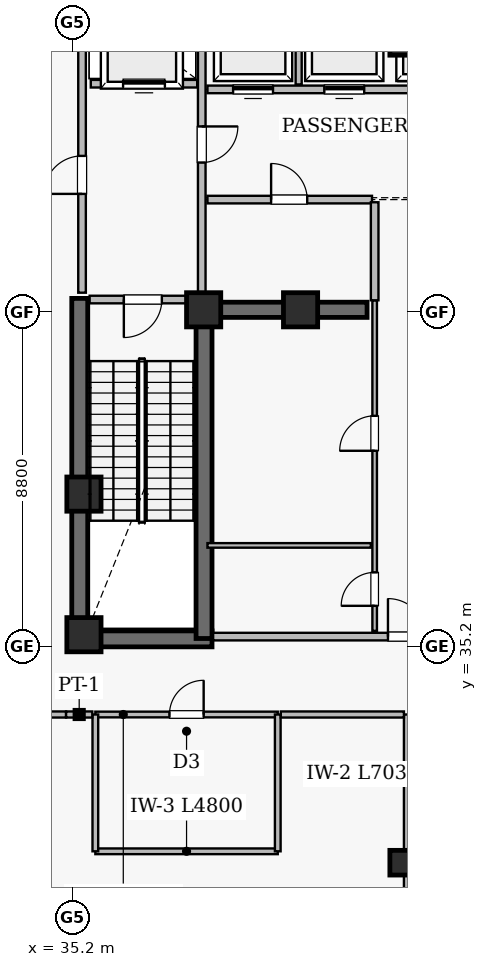
"""IFC4 building model, lengths in metres.
Left out: names, types, materials, properties, quantities, classifications, styles, units other than length and angle.
Written with IfcOpenShell. Run it as: python <this file> out.ifc"""

import sys

from ifc_helpers import new_model, si_unit, direction, frame, frame_2d, origin, origin_2d, place, context, subcontext, project, spatial, rectangle, extrude, element, fill, save


model = new_model("IFC4")
c1 = context("Model", 3, precision=1e-05, world=origin(), true_north=direction((0.0, 1.0)))
c2 = subcontext(c1, "Body", "Model", "MODEL_VIEW")
j1 = project(units=[si_unit("LENGTHUNIT", "METRE"), si_unit("PLANEANGLEUNIT", "RADIAN")], contexts=[c1])
p1 = place(None, origin())
s1 = spatial("IfcSite", under=j1, at=p1, CompositionType="ELEMENT")
p2 = place(p1, origin())
s2 = spatial("IfcBuilding", under=s1, at=p2, CompositionType="ELEMENT")
p3 = place(p2, frame((0.0, 0.0, 289.6)))
s3 = spatial("IfcBuildingStorey", under=s2, at=p3, CompositionType="ELEMENT", Elevation=289.6)
p4 = place(p3, frame((35.18, 35.39, 0.0), z_axis=(0.0, 0.0, 1.0), x_axis=(1.0, 0.0, 0.0)))
e1 = element("IfcWall", 1, at=p4, inside=s3, PredefinedType="SHEAR", context=c2, shape_type="SweptSolid", body=[
    extrude(rectangle(XDim=3.69, YDim=0.42, at=frame_2d((1.845, 0.0))), origin(), (0.0, 0.0, 1.0), 5.51),
])
p5 = place(p3, frame((35.39, 35.18, 0.0), z_axis=(0.0, 0.0, 1.0), x_axis=(0.0, 1.0, 0.0)))
e2 = element("IfcWall", 2, at=p5, inside=s3, PredefinedType="SHEAR", context=c2, shape_type="SweptSolid", body=[
    extrude(rectangle(XDim=9.17, YDim=0.42, at=frame_2d((4.585, 0.0))), origin(), (0.0, 0.0, 1.0), 5.51),
])
p6 = place(p3, frame((38.66, 35.4, 0.0), z_axis=(0.0, 0.0, 1.0), x_axis=(0.0, 1.0, 0.0)))
e3 = element("IfcWall", 3, at=p6, inside=s3, PredefinedType="SHEAR", context=c2, shape_type="SweptSolid", body=[
    extrude(rectangle(XDim=8.95, YDim=0.42, at=frame_2d((4.475, 0.0))), origin(), (0.0, 0.0, 1.0), 5.51),
])
p7 = place(p3, frame((44.0, 50.1, 0.0), z_axis=(0.0, 0.0, 1.0), x_axis=(0.0, 1.0, 0.0)))
e4 = element("IfcWall", 4, at=p7, inside=s3, PredefinedType="SHEAR", context=c2, shape_type="SweptSolid", body=[
    extrude(rectangle(XDim=2.1, YDim=0.4, at=frame_2d((1.05, 0.0))), origin(), (0.0, 0.0, 1.0), 5.51),
])
p8 = place(p3, frame((38.75, 44.05, 0.0), z_axis=(0.0, 0.0, 1.0), x_axis=(1.0, 0.0, 0.0)))
e5 = element("IfcWall", 5, at=p8, inside=s3, PredefinedType="SHEAR", context=c2, shape_type="SweptSolid", body=[
    extrude(rectangle(XDim=4.2, YDim=0.4, at=frame_2d((2.1, 0.0))), origin(), (0.0, 0.0, 1.0), 5.51),
])
for number, where, z_axis, x_axis in (
    (6, (35.5, 35.5, 0.0), (0.0, 0.0, 1.0), (1.0, 0.0, 0.0)),
    (7, (38.65, 44.05, 0.0), (0.0, 0.0, 1.0), (1.0, 0.0, 0.0)),
    (8, (44.0, 51.2, 0.0), (0.0, 0.0, 1.0), (1.0, 0.0, 0.0)),
    (9, (35.5, 39.2, 0.0), (0.0, 0.0, 1.0), (1.0, 0.0, 0.0)),
    (10, (41.2, 44.05, 0.0), (0.0, 0.0, 1.0), (1.0, 0.0, 0.0)),
):
    element("IfcColumn", number, at=place(p3, frame(where, z_axis=z_axis, x_axis=x_axis)), inside=s3, PredefinedType="COLUMN", context=c2, shape_type="SweptSolid", body=[
        extrude(rectangle(XDim=0.9, YDim=0.9, at=origin_2d()), origin(), (0.0, 0.0, 1.0), 5.8),
    ])
p9 = place(p3, frame((44.0, 29.5, 0.0), z_axis=(0.0, 0.0, 1.0), x_axis=(1.0, 0.0, 0.0)))
e11 = element("IfcColumn", 11, at=p9, inside=s3, PredefinedType="COLUMN", context=c2, shape_type="SweptSolid", body=[
    extrude(rectangle(XDim=0.9, YDim=0.65, at=origin_2d()), origin(), (0.0, 0.0, 1.0), 5.8),
])
p10 = place(p3, frame((38.9, 35.45, 0.0), z_axis=(0.0, 0.0, 1.0), x_axis=(1.0, 0.0, 0.0)))
e12 = element("IfcWall", 12, at=p10, inside=s3, PredefinedType="SOLIDWALL", context=c2, shape_type="SweptSolid", body=[
    extrude(rectangle(XDim=10.2, YDim=0.2, at=frame_2d((5.1, 0.0))), origin(), (0.0, 0.0, 1.0), 5.51),
])
p11 = place(p10, frame((4.6, 0.0, 0.0)))
e13 = element("IfcOpeningElement", 13, at=p11, cuts=e12, PredefinedType="OPENING", context=c2, shape_type="SweptSolid", body=[
    extrude(rectangle(XDim=1.0, YDim=2.15, at=frame_2d((0.5, 1.075))), frame((0.0, 0.11, 0.0), z_axis=(0.0, -1.0, 0.0), x_axis=(1.0, 0.0, 0.0)), (0.0, 0.0, 1.0), 0.22),
])
p12 = place(p3, frame((43.15, 35.6, 0.0), z_axis=(0.0, 0.0, 1.0), x_axis=(0.0, 1.0, 0.0)))
e14 = element("IfcWall", 14, at=p12, inside=s3, PredefinedType="PARTITIONING", context=c2, shape_type="SweptSolid", body=[
    extrude(rectangle(XDim=8.7, YDim=0.12, at=frame_2d((4.35, 0.0))), origin(), (0.0, 0.0, 1.0), 5.51),
])
p13 = place(p12, frame((0.66, 0.0, 0.0)))
e15 = element("IfcOpeningElement", 15, at=p13, cuts=e14, PredefinedType="OPENING", context=c2, shape_type="SweptSolid", body=[
    extrude(rectangle(XDim=0.88, YDim=2.1, at=frame_2d((0.44, 1.05))), frame((0.0, 0.07, 0.0), z_axis=(0.0, -1.0, 0.0), x_axis=(1.0, 0.0, 0.0)), (0.0, 0.0, 1.0), 0.14),
])
p14 = place(p12, frame((4.74, 0.0, 0.0)))
e16 = element("IfcOpeningElement", 16, at=p14, cuts=e14, PredefinedType="OPENING", context=c2, shape_type="SweptSolid", body=[
    extrude(rectangle(XDim=0.92, YDim=2.1, at=frame_2d((0.46, 1.05))), frame((0.0, 0.07, 0.0), z_axis=(0.0, -1.0, 0.0), x_axis=(1.0, 0.0, 0.0)), (0.0, 0.0, 1.0), 0.14),
])
p15 = place(p3, frame((35.45, 44.5, 0.0), z_axis=(0.0, 0.0, 1.0), x_axis=(0.0, 1.0, 0.0)))
e17 = element("IfcWall", 17, at=p15, inside=s3, PredefinedType="SOLIDWALL", context=c2, shape_type="SweptSolid", body=[
    extrude(rectangle(XDim=7.92, YDim=0.2, at=frame_2d((3.96, 0.0))), origin(), (0.0, 0.0, 1.0), 5.51),
])
p16 = place(p15, frame((2.6, 0.0, 0.0)))
e18 = element("IfcOpeningElement", 18, at=p16, cuts=e17, PredefinedType="OPENING", context=c2, shape_type="SweptSolid", body=[
    extrude(rectangle(XDim=1.0, YDim=2.15, at=frame_2d((0.5, 1.075))), frame((0.0, 0.11, 0.0), z_axis=(0.0, -1.0, 0.0), x_axis=(1.0, 0.0, 0.0)), (0.0, 0.0, 1.0), 0.22),
])
p17 = place(p3, frame((38.6, 44.5, 0.0), z_axis=(0.0, 0.0, 1.0), x_axis=(0.0, 1.0, 0.0)))
e19 = element("IfcWall", 19, at=p17, inside=s3, PredefinedType="SOLIDWALL", context=c2, shape_type="SweptSolid", body=[
    extrude(rectangle(XDim=7.92, YDim=0.2, at=frame_2d((3.96, 0.0))), origin(), (0.0, 0.0, 1.0), 5.51),
])
p18 = place(p17, frame((3.425, 0.0, 0.0)))
e20 = element("IfcOpeningElement", 20, at=p18, cuts=e19, PredefinedType="OPENING", context=c2, shape_type="SweptSolid", body=[
    extrude(rectangle(XDim=0.95, YDim=2.15, at=frame_2d((0.475, 1.075))), frame((0.0, 0.11, 0.0), z_axis=(0.0, -1.0, 0.0), x_axis=(1.0, 0.0, 0.0)), (0.0, 0.0, 1.0), 0.22),
])
p19 = place(p3, frame((38.75, 49.85, 0.0), z_axis=(0.0, 0.0, 1.0), x_axis=(1.0, 0.0, 0.0)))
e21 = element("IfcWall", 21, at=p19, inside=s3, PredefinedType="SOLIDWALL", context=c2, shape_type="SweptSolid", body=[
    extrude(rectangle(XDim=5.5, YDim=0.2, at=frame_2d((2.75, 0.0))), origin(), (0.0, 0.0, 1.0), 5.51),
])
p20 = place(p19, frame((0.675, 0.0, 0.0)))
e22 = element("IfcOpeningElement", 22, at=p20, cuts=e21, PredefinedType="OPENING", context=c2, shape_type="SweptSolid", body=[
    extrude(rectangle(XDim=1.05, YDim=2.15, at=frame_2d((0.525, 1.075))), frame((0.0, 0.11, 0.0), z_axis=(0.0, -1.0, 0.0), x_axis=(1.0, 0.0, 0.0)), (0.0, 0.0, 1.0), 0.22),
])
p21 = place(p19, frame((3.075, 0.0, 0.0)))
e23 = element("IfcOpeningElement", 23, at=p21, cuts=e21, PredefinedType="OPENING", context=c2, shape_type="SweptSolid", body=[
    extrude(rectangle(XDim=1.05, YDim=2.15, at=frame_2d((0.525, 1.075))), frame((0.0, 0.11, 0.0), z_axis=(0.0, -1.0, 0.0), x_axis=(1.0, 0.0, 0.0)), (0.0, 0.0, 1.0), 0.22),
])
p22 = place(p3, frame((35.8, 33.4, 0.0), z_axis=(0.0, 0.0, 1.0), x_axis=(1.0, 0.0, 0.0)))
e24 = element("IfcWall", 24, at=p22, inside=s3, PredefinedType="PLUMBINGWALL", context=c2, shape_type="SweptSolid", body=[
    extrude(rectangle(XDim=4.8, YDim=0.15, at=frame_2d((2.4, 0.0))), origin(), (0.0, 0.0, 1.0), 4.848),
])
p23 = place(p22, frame((1.95, 0.0, 0.0)))
e25 = element("IfcOpeningElement", 25, at=p23, cuts=e24, PredefinedType="OPENING", context=c2, shape_type="SweptSolid", body=[
    extrude(rectangle(XDim=0.9, YDim=2.1, at=frame_2d((0.45, 1.05))), frame((0.0, 0.085, 0.0), z_axis=(0.0, -1.0, 0.0), x_axis=(1.0, 0.0, 0.0)), (0.0, 0.0, 1.0), 0.17),
])
p24 = place(p3, frame((38.75, 46.95, 0.0), z_axis=(0.0, 0.0, 1.0), x_axis=(1.0, 0.0, 0.0)))
e26 = element("IfcWall", 26, at=p24, inside=s3, PredefinedType="SOLIDWALL", context=c2, shape_type="SweptSolid", body=[
    extrude(rectangle(XDim=4.33, YDim=0.2, at=frame_2d((2.165, 0.0))), origin(), (0.0, 0.0, 1.0), 5.51),
])
p25 = place(p24, frame((1.675, 0.0, 0.0)))
e27 = element("IfcOpeningElement", 27, at=p25, cuts=e26, PredefinedType="OPENING", context=c2, shape_type="SweptSolid", body=[
    extrude(rectangle(XDim=0.95, YDim=2.1, at=frame_2d((0.475, 1.05))), frame((0.0, 0.11, 0.0), z_axis=(0.0, -1.0, 0.0), x_axis=(1.0, 0.0, 0.0)), (0.0, 0.0, 1.0), 0.22),
])
p26 = place(p3, frame((35.65, 44.32, 0.0), z_axis=(0.0, 0.0, 1.0), x_axis=(1.0, 0.0, 0.0)))
e28 = element("IfcWall", 28, at=p26, inside=s3, PredefinedType="SOLIDWALL", context=c2, shape_type="SweptSolid", body=[
    extrude(rectangle(XDim=2.8, YDim=0.2, at=frame_2d((1.4, 0.0))), origin(), (0.0, 0.0, 1.0), 5.51),
])
p27 = place(p26, frame((0.9, 0.0, 0.0)))
e29 = element("IfcOpeningElement", 29, at=p27, cuts=e28, PredefinedType="OPENING", context=c2, shape_type="SweptSolid", body=[
    extrude(rectangle(XDim=1.0, YDim=2.15, at=frame_2d((0.5, 1.075))), frame((0.0, 0.11, 0.0), z_axis=(0.0, -1.0, 0.0), x_axis=(1.0, 0.0, 0.0)), (0.0, 0.0, 1.0), 0.22),
])
p28 = place(p3, frame((35.68, 50.0, 0.0), z_axis=(0.0, 0.0, 1.0), x_axis=(1.0, 0.0, 0.0)))
e30 = element("IfcWall", 30, at=p28, inside=s3, PredefinedType="SOLIDWALL", context=c2, shape_type="SweptSolid", body=[
    extrude(rectangle(XDim=2.8, YDim=0.2, at=frame_2d((1.4, 0.0))), origin(), (0.0, 0.0, 1.0), 5.51),
])
p29 = place(p28, frame((0.85, 0.0, 0.0)))
e31 = element("IfcOpeningElement", 31, at=p29, cuts=e30, PredefinedType="OPENING", context=c2, shape_type="SweptSolid", body=[
    extrude(rectangle(XDim=1.1, YDim=2.15, at=frame_2d((0.55, 1.075))), frame((0.0, 0.11, 0.0), z_axis=(0.0, -1.0, 0.0), x_axis=(1.0, 0.0, 0.0)), (0.0, 0.0, 1.0), 0.22),
])
p30 = place(p3, frame((44.0, 26.363, 0.0), z_axis=(0.0, 0.0, 1.0), x_axis=(0.0, 1.0, 0.0)))
e32 = element("IfcWall", 32, at=p30, inside=s3, PredefinedType="SOLIDWALL", context=c2, shape_type="SweptSolid", body=[
    extrude(rectangle(XDim=7.037, YDim=0.16, at=frame_2d((3.519, 0.0))), origin(), (0.0, 0.0, 1.0), 4.848),
])
p31 = place(p3, frame((35.8, 29.8, 0.0), z_axis=(0.0, 0.0, 1.0), x_axis=(1.0, 0.0, 0.0)))
e33 = element("IfcWall", 33, at=p31, inside=s3, PredefinedType="PLUMBINGWALL", context=c2, shape_type="SweptSolid", body=[
    extrude(rectangle(XDim=4.8, YDim=0.15, at=frame_2d((2.4, 0.0))), origin(), (0.0, 0.0, 1.0), 5.51),
])
p32 = place(p3, frame((38.75, 37.85, 0.0), z_axis=(0.0, 0.0, 1.0), x_axis=(1.0, 0.0, 0.0)))
e34 = element("IfcWall", 34, at=p32, inside=s3, PredefinedType="PARTITIONING", context=c2, shape_type="SweptSolid", body=[
    extrude(rectangle(XDim=4.3, YDim=0.12, at=frame_2d((2.15, 0.0))), origin(), (0.0, 0.0, 1.0), 5.51),
])
p33 = place(p3, frame((35.8, 33.4, 0.0), z_axis=(0.0, 0.0, 1.0), x_axis=(0.0, -1.0, 0.0)))
e35 = element("IfcWall", 35, at=p33, inside=s3, PredefinedType="PLUMBINGWALL", context=c2, shape_type="SweptSolid", body=[
    extrude(rectangle(XDim=3.6, YDim=0.15, at=frame_2d((1.8, 0.0))), origin(), (0.0, 0.0, 1.0), 5.51),
])
p34 = place(p3, frame((40.6, 29.8, 0.0), z_axis=(0.0, 0.0, 1.0), x_axis=(0.0, 1.0, 0.0)))
e36 = element("IfcWall", 36, at=p34, inside=s3, PredefinedType="PLUMBINGWALL", context=c2, shape_type="SweptSolid", body=[
    extrude(rectangle(XDim=3.6, YDim=0.15, at=frame_2d((1.8, 0.0))), origin(), (0.0, 0.0, 1.0), 4.848),
])
p35 = place(p3, frame((40.68, 33.4, 0.0), z_axis=(0.0, 0.0, 1.0), x_axis=(1.0, 0.0, 0.0)))
e37 = element("IfcWall", 37, at=p35, inside=s3, PredefinedType="SOLIDWALL", context=c2, shape_type="SweptSolid", body=[
    extrude(rectangle(XDim=3.24, YDim=0.16, at=frame_2d((1.62, 0.0))), origin(), (0.0, 0.0, 1.0), 5.51),
])
p36 = place(p3, frame((43.15, 44.3, 0.0), z_axis=(0.0, 0.0, 1.0), x_axis=(0.0, 1.0, 0.0)))
e38 = element("IfcWall", 38, at=p36, inside=s3, PredefinedType="SOLIDWALL", context=c2, shape_type="SweptSolid", body=[
    extrude(rectangle(XDim=2.58, YDim=0.2, at=frame_2d((1.29, 0.0))), origin(), (0.0, 0.0, 1.0), 5.51),
])
p37 = place(p3, frame((41.15, 49.98, 0.0), z_axis=(0.0, 0.0, 1.0), x_axis=(0.0, 1.0, 0.0)))
e39 = element("IfcWall", 39, at=p37, inside=s3, PredefinedType="SOLIDWALL", context=c2, shape_type="SweptSolid", body=[
    extrude(rectangle(XDim=2.37, YDim=0.16, at=frame_2d((1.185, 0.0))), origin(), (0.0, 0.0, 1.0), 5.51),
])
p38 = place(p3, frame((33.48, 33.4, 0.0), z_axis=(0.0, 0.0, 1.0), x_axis=(1.0, 0.0, 0.0)))
e40 = element("IfcWall", 40, at=p38, inside=s3, PredefinedType="SOLIDWALL", context=c2, shape_type="SweptSolid", body=[
    extrude(rectangle(XDim=1.55, YDim=0.16, at=frame_2d((0.775, 0.0))), origin(), (0.0, 0.0, 1.0), 5.51),
])
p39 = place(p3, frame((35.03, 33.4, 0.0), z_axis=(0.0, 0.0, 1.0), x_axis=(1.0, 0.0, 0.0)))
e41 = element("IfcWall", 41, at=p39, inside=s3, PredefinedType="SOLIDWALL", context=c2, shape_type="SweptSolid", body=[
    extrude(rectangle(XDim=0.69, YDim=0.16, at=frame_2d((0.345, 0.0))), origin(), (0.0, 0.0, 1.0), 5.51),
])
p40 = place(p27, frame((1.0, 0.0, 0.0), z_axis=(0.0, 0.0, 1.0), x_axis=(-1.0, 0.0, 0.0)))
e42 = element("IfcDoor", 42, at=p40, inside=s3, OperationType="SINGLE_SWING_LEFT", PredefinedType="DOOR", context=c2, shape_type="SweptSolid", body=[
    extrude(rectangle(XDim=1.0, YDim=2.15, at=frame_2d((0.5, 1.075))), frame((0.0, 0.025, 0.0), z_axis=(0.0, -1.0, 0.0), x_axis=(1.0, 0.0, 0.0)), (0.0, 0.0, 1.0), 0.05),
])
fill(e29, e42)
p41 = place(p16, origin())
e43 = element("IfcDoor", 43, at=p41, inside=s3, OperationType="SINGLE_SWING_LEFT", PredefinedType="DOOR", context=c2, shape_type="SweptSolid", body=[
    extrude(rectangle(XDim=1.0, YDim=2.15, at=frame_2d((0.5, 1.075))), frame((0.0, 0.025, 0.0), z_axis=(0.0, -1.0, 0.0), x_axis=(1.0, 0.0, 0.0)), (0.0, 0.0, 1.0), 0.05),
])
fill(e18, e43)
p42 = place(p18, frame((0.95, 0.0, 0.0), z_axis=(0.0, 0.0, 1.0), x_axis=(-1.0, 0.0, 0.0)))
e44 = element("IfcDoor", 44, at=p42, inside=s3, OperationType="SINGLE_SWING_RIGHT", PredefinedType="DOOR", context=c2, shape_type="SweptSolid", body=[
    extrude(rectangle(XDim=0.95, YDim=2.15, at=frame_2d((0.475, 1.075))), frame((0.0, 0.025, 0.0), z_axis=(0.0, -1.0, 0.0), x_axis=(1.0, 0.0, 0.0)), (0.0, 0.0, 1.0), 0.05),
])
fill(e20, e44)
p43 = place(p29, origin())
e45 = element("IfcDoor", 45, at=p43, inside=s3, OperationType="SLIDING_TO_LEFT", PredefinedType="DOOR", context=c2, shape_type="SweptSolid", body=[
    extrude(rectangle(XDim=1.1, YDim=2.15, at=frame_2d((0.55, 1.075))), frame((0.0, 0.025, 0.0), z_axis=(0.0, -1.0, 0.0), x_axis=(1.0, 0.0, 0.0)), (0.0, 0.0, 1.0), 0.05),
])
fill(e31, e45)
p44 = place(p11, origin())
e46 = element("IfcDoor", 46, at=p44, inside=s3, OperationType="SINGLE_SWING_LEFT", PredefinedType="DOOR", context=c2, shape_type="SweptSolid", body=[
    extrude(rectangle(XDim=1.0, YDim=2.15, at=frame_2d((0.5, 1.075))), frame((0.0, 0.025, 0.0), z_axis=(0.0, -1.0, 0.0), x_axis=(1.0, 0.0, 0.0)), (0.0, 0.0, 1.0), 0.05),
])
fill(e13, e46)
p45 = place(p20, origin())
e47 = element("IfcDoor", 47, at=p45, inside=s3, OperationType="SLIDING_TO_LEFT", PredefinedType="DOOR", context=c2, shape_type="SweptSolid", body=[
    extrude(rectangle(XDim=1.05, YDim=2.15, at=frame_2d((0.525, 1.075))), frame((0.0, 0.025, 0.0), z_axis=(0.0, -1.0, 0.0), x_axis=(1.0, 0.0, 0.0)), (0.0, 0.0, 1.0), 0.05),
])
fill(e22, e47)
p46 = place(p21, origin())
e48 = element("IfcDoor", 48, at=p46, inside=s3, OperationType="SLIDING_TO_LEFT", PredefinedType="DOOR", context=c2, shape_type="SweptSolid", body=[
    extrude(rectangle(XDim=1.05, YDim=2.15, at=frame_2d((0.525, 1.075))), frame((0.0, 0.025, 0.0), z_axis=(0.0, -1.0, 0.0), x_axis=(1.0, 0.0, 0.0)), (0.0, 0.0, 1.0), 0.05),
])
fill(e23, e48)
p47 = place(p25, origin())
e49 = element("IfcDoor", 49, at=p47, inside=s3, OperationType="SINGLE_SWING_LEFT", PredefinedType="DOOR", context=c2, shape_type="SweptSolid", body=[
    extrude(rectangle(XDim=0.95, YDim=2.1, at=frame_2d((0.475, 1.05))), frame((0.0, 0.025, 0.0), z_axis=(0.0, -1.0, 0.0), x_axis=(1.0, 0.0, 0.0)), (0.0, 0.0, 1.0), 0.05),
])
fill(e27, e49)
p48 = place(p13, origin())
e50 = element("IfcDoor", 50, at=p48, inside=s3, OperationType="SINGLE_SWING_LEFT", PredefinedType="DOOR", context=c2, shape_type="SweptSolid", body=[
    extrude(rectangle(XDim=0.88, YDim=2.1, at=frame_2d((0.44, 1.05))), frame((0.0, 0.025, 0.0), z_axis=(0.0, -1.0, 0.0), x_axis=(1.0, 0.0, 0.0)), (0.0, 0.0, 1.0), 0.05),
])
fill(e15, e50)
p49 = place(p14, origin())
e51 = element("IfcDoor", 51, at=p49, inside=s3, OperationType="SINGLE_SWING_LEFT", PredefinedType="DOOR", context=c2, shape_type="SweptSolid", body=[
    extrude(rectangle(XDim=0.92, YDim=2.1, at=frame_2d((0.46, 1.05))), frame((0.0, 0.025, 0.0), z_axis=(0.0, -1.0, 0.0), x_axis=(1.0, 0.0, 0.0)), (0.0, 0.0, 1.0), 0.05),
])
fill(e16, e51)
p50 = place(p23, origin())
e52 = element("IfcDoor", 52, at=p50, inside=s3, OperationType="SINGLE_SWING_RIGHT", PredefinedType="DOOR", context=c2, shape_type="SweptSolid", body=[
    extrude(rectangle(XDim=0.9, YDim=2.1, at=frame_2d((0.45, 1.05))), frame((0.0, 0.025, 0.0), z_axis=(0.0, -1.0, 0.0), x_axis=(1.0, 0.0, 0.0)), (0.0, 0.0, 1.0), 0.05),
])
fill(e25, e52)
save(model, sys.argv[1])
